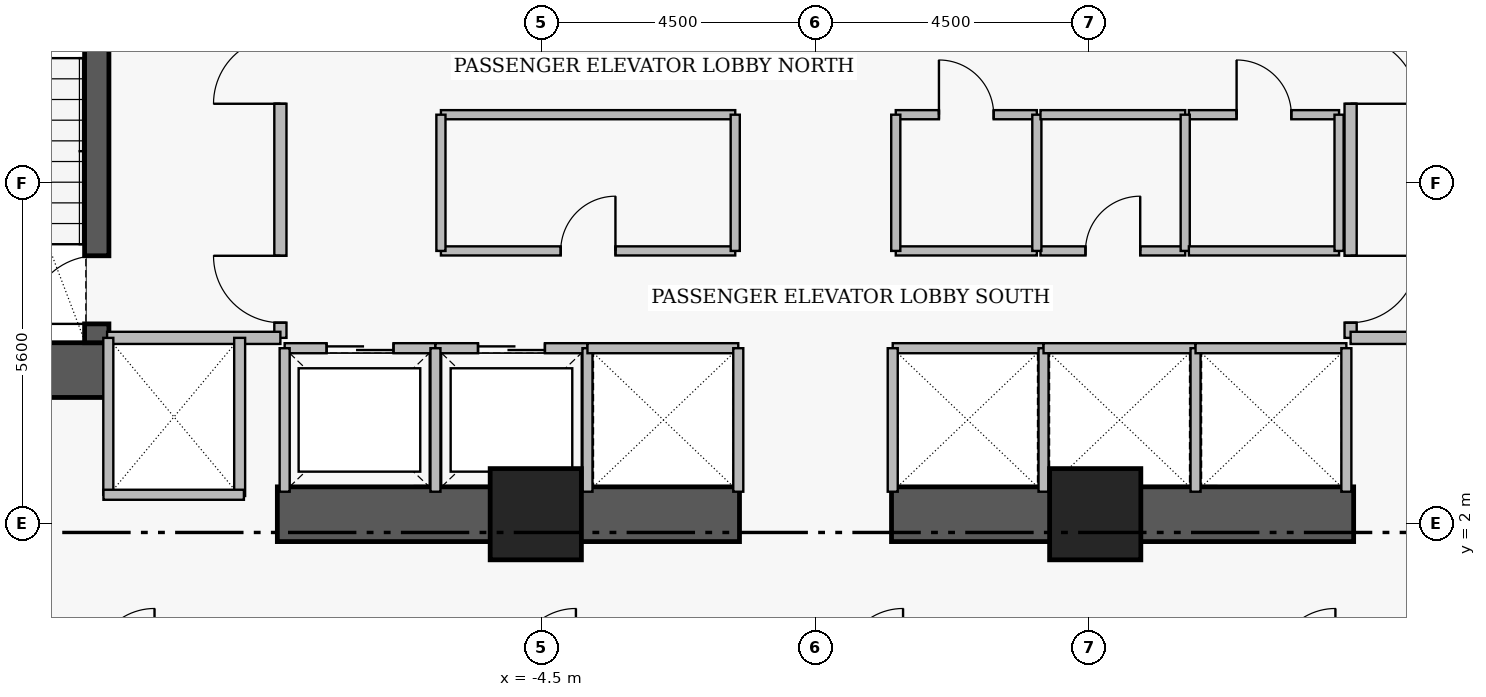
"""IFC4 building model, lengths in metres.
Left out: names, types, materials, properties, quantities, classifications, styles, units other than length and angle.
Written with IfcOpenShell. Run it as: python <this file> out.ifc"""

import sys

from ifc_helpers import new_model, si_unit, direction, frame, frame_2d, origin, origin_2d, place, context, subcontext, project, spatial, rectangle, extrude, element, fill, save


model = new_model("IFC4")
c1 = context("Model", 3, precision=1e-05, world=origin(), true_north=direction((0.0, 1.0)))
c2 = subcontext(c1, "Body", "Model", "MODEL_VIEW")
j1 = project(units=[si_unit("LENGTHUNIT", "METRE"), si_unit("PLANEANGLEUNIT", "RADIAN")], contexts=[c1])
p1 = place(None, origin())
s1 = spatial("IfcSite", under=j1, at=p1, CompositionType="ELEMENT")
p2 = place(p1, origin())
s2 = spatial("IfcBuilding", under=s1, at=p2, CompositionType="ELEMENT")
p3 = place(p2, frame((0.0, 0.0, 38.55)))
s3 = spatial("IfcBuildingStorey", under=s2, at=p3, CompositionType="ELEMENT", Elevation=38.55)
p4 = place(p3, frame((-16.31, 4.52, 0.0), z_axis=(0.0, 0.0, 1.0), x_axis=(1.0, 0.0, 0.0)))
e1 = element("IfcWall", 1, at=p4, inside=s3, PredefinedType="SHEAR", context=c2, shape_type="SweptSolid", body=[
    extrude(rectangle(XDim=4.71, YDim=0.9, at=frame_2d((2.355, 0.0))), origin(), (0.0, 0.0, 1.0), 3.46),
])
for number, where, z_axis, x_axis in (
    (2, (-8.85, 2.15, 0.0), (0.0, 0.0, 1.0), (1.0, 0.0, 0.0)),
    (3, (1.25, 2.15, 0.0), (0.0, 0.0, 1.0), (1.0, 0.0, 0.0)),
):
    element("IfcWall", number, at=place(p3, frame(where, z_axis=z_axis, x_axis=x_axis)), inside=s3, PredefinedType="SHEAR", context=c2, shape_type="SweptSolid", body=[
        extrude(rectangle(XDim=7.6, YDim=0.9, at=frame_2d((3.8, 0.0))), origin(), (0.0, 0.0, 1.0), 3.43),
    ])
p5 = place(p3, frame((-11.82, 4.97, 0.0), z_axis=(0.0, 0.0, 1.0), x_axis=(0.0, 1.0, 0.0)))
e4 = element("IfcWall", 4, at=p5, inside=s3, PredefinedType="SHEAR", context=c2, shape_type="SweptSolid", body=[
    extrude(rectangle(XDim=8.96, YDim=0.4, at=frame_2d((4.48, 0.0))), origin(), (0.0, 0.0, 1.0), 3.46),
])
p6 = place(p5, frame((0.31, 0.0, 0.0)))
e5 = element("IfcOpeningElement", 5, at=p6, cuts=e4, PredefinedType="OPENING", context=c2, shape_type="SweptSolid", body=[
    extrude(rectangle(XDim=1.12, YDim=2.22, at=frame_2d((0.56, 1.11))), frame((0.0, 0.21, 0.0), z_axis=(0.0, -1.0, 0.0), x_axis=(1.0, 0.0, 0.0)), (0.0, 0.0, 1.0), 0.42),
])
for number, where, z_axis, x_axis in (
    (6, (-4.6, 2.15, 0.0), (0.0, 0.0, 1.0), (1.0, 0.0, 0.0)),
    (7, (4.6, 2.15, 0.0), (0.0, 0.0, 1.0), (1.0, 0.0, 0.0)),
):
    element("IfcColumn", number, at=place(p3, frame(where, z_axis=z_axis, x_axis=x_axis)), inside=s3, PredefinedType="COLUMN", context=c2, shape_type="SweptSolid", body=[
        extrude(rectangle(XDim=1.5, YDim=1.5, at=origin_2d()), origin(), (0.0, 0.0, 1.0), 3.65),
    ])
p7 = place(p3, frame((-8.8, 5.05, 0.0), z_axis=(0.0, 0.0, 1.0), x_axis=(0.0, 1.0, 0.0)))
e8 = element("IfcWall", 8, at=p7, inside=s3, PredefinedType="PARTITIONING", context=c2, shape_type="SweptSolid", body=[
    extrude(rectangle(XDim=6.1, YDim=0.2, at=frame_2d((3.05, 0.0))), origin(), (0.0, 0.0, 1.0), 3.43),
])
p8 = place(p7, frame((0.25, 0.0, 0.0)))
e9 = element("IfcOpeningElement", 9, at=p8, cuts=e8, PredefinedType="OPENING", context=c2, shape_type="SweptSolid", body=[
    extrude(rectangle(XDim=1.1, YDim=2.2, at=frame_2d((0.55, 1.1))), frame((0.0, 0.11, 0.0), z_axis=(0.0, -1.0, 0.0), x_axis=(1.0, 0.0, 0.0)), (0.0, 0.0, 1.0), 0.22),
])
p9 = place(p7, frame((3.85, 0.0, 0.0)))
e10 = element("IfcOpeningElement", 10, at=p9, cuts=e8, PredefinedType="OPENING", context=c2, shape_type="SweptSolid", body=[
    extrude(rectangle(XDim=1.1, YDim=2.2, at=frame_2d((0.55, 1.1))), frame((0.0, 0.11, 0.0), z_axis=(0.0, -1.0, 0.0), x_axis=(1.0, 0.0, 0.0)), (0.0, 0.0, 1.0), 0.22),
])
p10 = place(p3, frame((8.8, 11.15, 0.0), z_axis=(0.0, 0.0, 1.0), x_axis=(0.0, -1.0, 0.0)))
e11 = element("IfcWall", 11, at=p10, inside=s3, PredefinedType="PARTITIONING", context=c2, shape_type="SweptSolid", body=[
    extrude(rectangle(XDim=6.1, YDim=0.2, at=frame_2d((3.05, 0.0))), origin(), (0.0, 0.0, 1.0), 3.43),
])
p11 = place(p10, frame((1.15, 0.0, 0.0)))
e12 = element("IfcOpeningElement", 12, at=p11, cuts=e11, PredefinedType="OPENING", context=c2, shape_type="SweptSolid", body=[
    extrude(rectangle(XDim=1.1, YDim=2.2, at=frame_2d((0.55, 1.1))), frame((0.0, 0.11, 0.0), z_axis=(0.0, -1.0, 0.0), x_axis=(1.0, 0.0, 0.0)), (0.0, 0.0, 1.0), 0.22),
])
p12 = place(p10, frame((4.75, 0.0, 0.0)))
e13 = element("IfcOpeningElement", 13, at=p12, cuts=e11, PredefinedType="OPENING", context=c2, shape_type="SweptSolid", body=[
    extrude(rectangle(XDim=1.1, YDim=2.2, at=frame_2d((0.55, 1.1))), frame((0.0, 0.11, 0.0), z_axis=(0.0, -1.0, 0.0), x_axis=(1.0, 0.0, 0.0)), (0.0, 0.0, 1.0), 0.22),
])
p13 = place(p3, frame((-8.73, 4.88, 0.0), z_axis=(0.0, 0.0, 1.0), x_axis=(1.0, 0.0, 0.0)))
e14 = element("IfcWall", 14, at=p13, inside=s3, PredefinedType="PARTITIONING", context=c2, shape_type="SweptSolid", body=[
    extrude(rectangle(XDim=2.48, YDim=0.165, at=frame_2d((1.24, 0.0))), origin(), (0.0, 0.0, 1.0), 3.43),
])
p14 = place(p13, frame((0.69, 0.0, 0.0)))
e15 = element("IfcOpeningElement", 15, at=p14, cuts=e14, PredefinedType="OPENING", context=c2, shape_type="SweptSolid", body=[
    extrude(rectangle(XDim=1.1, YDim=2.25, at=frame_2d((0.55, 1.125))), frame((0.0, 0.093, 0.0), z_axis=(0.0, -1.0, 0.0), x_axis=(1.0, 0.0, 0.0)), (0.0, 0.0, 1.0), 0.185),
])
p15 = place(p3, frame((-6.25, 4.88, 0.0), z_axis=(0.0, 0.0, 1.0), x_axis=(1.0, 0.0, 0.0)))
e16 = element("IfcWall", 16, at=p15, inside=s3, PredefinedType="PARTITIONING", context=c2, shape_type="SweptSolid", body=[
    extrude(rectangle(XDim=2.5, YDim=0.165, at=frame_2d((1.25, 0.0))), origin(), (0.0, 0.0, 1.0), 3.43),
])
p16 = place(p15, frame((0.7, 0.0, 0.0)))
e17 = element("IfcOpeningElement", 17, at=p16, cuts=e16, PredefinedType="OPENING", context=c2, shape_type="SweptSolid", body=[
    extrude(rectangle(XDim=1.1, YDim=2.25, at=frame_2d((0.55, 1.125))), frame((0.0, 0.093, 0.0), z_axis=(0.0, -1.0, 0.0), x_axis=(1.0, 0.0, 0.0)), (0.0, 0.0, 1.0), 0.185),
])
p17 = place(p3, frame((-6.16, 6.48, 0.0), z_axis=(0.0, 0.0, 1.0), x_axis=(1.0, 0.0, 0.0)))
e18 = element("IfcWall", 18, at=p17, inside=s3, PredefinedType="PARTITIONING", context=c2, shape_type="SweptSolid", body=[
    extrude(rectangle(XDim=4.84, YDim=0.15, at=frame_2d((2.42, 0.0))), origin(), (0.0, 0.0, 1.0), 3.43),
])
p18 = place(p17, frame((1.97, 0.0, 0.0)))
e19 = element("IfcOpeningElement", 19, at=p18, cuts=e18, PredefinedType="OPENING", context=c2, shape_type="SweptSolid", body=[
    extrude(rectangle(XDim=0.9, YDim=2.15, at=frame_2d((0.45, 1.075))), frame((0.0, 0.085, 0.0), z_axis=(0.0, -1.0, 0.0), x_axis=(1.0, 0.0, 0.0)), (0.0, 0.0, 1.0), 0.17),
])
p19 = place(p3, frame((1.32, 8.72, 0.0), z_axis=(0.0, 0.0, 1.0), x_axis=(1.0, 0.0, 0.0)))
e20 = element("IfcWall", 20, at=p19, inside=s3, PredefinedType="PARTITIONING", context=c2, shape_type="SweptSolid", body=[
    extrude(rectangle(XDim=2.32, YDim=0.15, at=frame_2d((1.16, 0.0))), origin(), (0.0, 0.0, 1.0), 3.43),
])
p20 = place(p19, frame((0.71, 0.0, 0.0)))
e21 = element("IfcOpeningElement", 21, at=p20, cuts=e20, PredefinedType="OPENING", context=c2, shape_type="SweptSolid", body=[
    extrude(rectangle(XDim=0.9, YDim=2.15, at=frame_2d((0.45, 1.075))), frame((0.0, 0.085, 0.0), z_axis=(0.0, -1.0, 0.0), x_axis=(1.0, 0.0, 0.0)), (0.0, 0.0, 1.0), 0.17),
])
p21 = place(p3, frame((3.7, 6.48, 0.0), z_axis=(0.0, 0.0, 1.0), x_axis=(1.0, 0.0, 0.0)))
e22 = element("IfcWall", 22, at=p21, inside=s3, PredefinedType="PARTITIONING", context=c2, shape_type="SweptSolid", body=[
    extrude(rectangle(XDim=2.38, YDim=0.15, at=frame_2d((1.19, 0.0))), origin(), (0.0, 0.0, 1.0), 3.43),
])
p22 = place(p21, frame((0.74, 0.0, 0.0)))
e23 = element("IfcOpeningElement", 23, at=p22, cuts=e22, PredefinedType="OPENING", context=c2, shape_type="SweptSolid", body=[
    extrude(rectangle(XDim=0.9, YDim=2.15, at=frame_2d((0.45, 1.075))), frame((0.0, 0.085, 0.0), z_axis=(0.0, -1.0, 0.0), x_axis=(1.0, 0.0, 0.0)), (0.0, 0.0, 1.0), 0.17),
])
p23 = place(p3, frame((6.14, 8.72, 0.0), z_axis=(0.0, 0.0, 1.0), x_axis=(1.0, 0.0, 0.0)))
e24 = element("IfcWall", 24, at=p23, inside=s3, PredefinedType="PARTITIONING", context=c2, shape_type="SweptSolid", body=[
    extrude(rectangle(XDim=2.47, YDim=0.15, at=frame_2d((1.235, 0.0))), origin(), (0.0, 0.0, 1.0), 3.43),
])
p24 = place(p23, frame((0.785, 0.0, 0.0)))
e25 = element("IfcOpeningElement", 25, at=p24, cuts=e24, PredefinedType="OPENING", context=c2, shape_type="SweptSolid", body=[
    extrude(rectangle(XDim=0.9, YDim=2.15, at=frame_2d((0.45, 1.075))), frame((0.0, 0.085, 0.0), z_axis=(0.0, -1.0, 0.0), x_axis=(1.0, 0.0, 0.0)), (0.0, 0.0, 1.0), 0.17),
])
for number, where, z_axis, x_axis in (
    (26, (-11.65, 5.05, 0.0), (0.0, 0.0, 1.0), (1.0, 0.0, 0.0)),
    (27, (8.8, 5.05, 0.0), (0.0, 0.0, 1.0), (1.0, 0.0, 0.0)),
):
    element("IfcWall", number, at=place(p3, frame(where, z_axis=z_axis, x_axis=x_axis)), inside=s3, PredefinedType="PARTITIONING", context=c2, shape_type="SweptSolid", body=[
        extrude(rectangle(XDim=2.85, YDim=0.2, at=frame_2d((1.425, 0.0))), origin(), (0.0, 0.0, 1.0), 3.43),
    ])
for number, where, z_axis, x_axis in (
    (28, (-8.73, 2.52, 0.0), (0.0, 0.0, 1.0), (0.0, 1.0, 0.0)),
    (29, (-6.25, 2.52, 0.0), (0.0, 0.0, 1.0), (0.0, 1.0, 0.0)),
    (30, (-3.75, 2.52, 0.0), (0.0, 0.0, 1.0), (0.0, 1.0, 0.0)),
):
    element("IfcWall", number, at=place(p3, frame(where, z_axis=z_axis, x_axis=x_axis)), inside=s3, PredefinedType="PARTITIONING", context=c2, shape_type="SweptSolid", body=[
        extrude(rectangle(XDim=2.36, YDim=0.165, at=frame_2d((1.18, 0.0))), origin(), (0.0, 0.0, 1.0), 3.43),
    ])
p25 = place(p3, frame((-3.75, 4.88, 0.0), z_axis=(0.0, 0.0, 1.0), x_axis=(1.0, 0.0, 0.0)))
e31 = element("IfcWall", 31, at=p25, inside=s3, PredefinedType="PARTITIONING", context=c2, shape_type="SweptSolid", body=[
    extrude(rectangle(XDim=2.48, YDim=0.165, at=frame_2d((1.24, 0.0))), origin(), (0.0, 0.0, 1.0), 3.43),
])
p26 = place(p3, frame((-1.27, 2.52, 0.0), z_axis=(0.0, 0.0, 1.0), x_axis=(0.0, 1.0, 0.0)))
e32 = element("IfcWall", 32, at=p26, inside=s3, PredefinedType="PARTITIONING", context=c2, shape_type="SweptSolid", body=[
    extrude(rectangle(XDim=2.36, YDim=0.165, at=frame_2d((1.18, 0.0))), origin(), (0.0, 0.0, 1.0), 3.43),
])
p27 = place(p3, frame((1.27, 4.88, 0.0), z_axis=(0.0, 0.0, 1.0), x_axis=(1.0, 0.0, 0.0)))
e33 = element("IfcWall", 33, at=p27, inside=s3, PredefinedType="PARTITIONING", context=c2, shape_type="SweptSolid", body=[
    extrude(rectangle(XDim=2.48, YDim=0.165, at=frame_2d((1.24, 0.0))), origin(), (0.0, 0.0, 1.0), 3.43),
])
for number, where, z_axis, x_axis in (
    (34, (1.27, 2.52, 0.0), (0.0, 0.0, 1.0), (0.0, 1.0, 0.0)),
    (35, (3.75, 2.52, 0.0), (0.0, 0.0, 1.0), (0.0, 1.0, 0.0)),
):
    element("IfcWall", number, at=place(p3, frame(where, z_axis=z_axis, x_axis=x_axis)), inside=s3, PredefinedType="PARTITIONING", context=c2, shape_type="SweptSolid", body=[
        extrude(rectangle(XDim=2.36, YDim=0.165, at=frame_2d((1.18, 0.0))), origin(), (0.0, 0.0, 1.0), 3.43),
    ])
p28 = place(p3, frame((3.75, 4.88, 0.0), z_axis=(0.0, 0.0, 1.0), x_axis=(1.0, 0.0, 0.0)))
e36 = element("IfcWall", 36, at=p28, inside=s3, PredefinedType="PARTITIONING", context=c2, shape_type="SweptSolid", body=[
    extrude(rectangle(XDim=2.5, YDim=0.165, at=frame_2d((1.25, 0.0))), origin(), (0.0, 0.0, 1.0), 3.43),
])
p29 = place(p3, frame((6.25, 2.52, 0.0), z_axis=(0.0, 0.0, 1.0), x_axis=(0.0, 1.0, 0.0)))
e37 = element("IfcWall", 37, at=p29, inside=s3, PredefinedType="PARTITIONING", context=c2, shape_type="SweptSolid", body=[
    extrude(rectangle(XDim=2.36, YDim=0.165, at=frame_2d((1.18, 0.0))), origin(), (0.0, 0.0, 1.0), 3.43),
])
p30 = place(p3, frame((6.25, 4.88, 0.0), z_axis=(0.0, 0.0, 1.0), x_axis=(1.0, 0.0, 0.0)))
e38 = element("IfcWall", 38, at=p30, inside=s3, PredefinedType="PARTITIONING", context=c2, shape_type="SweptSolid", body=[
    extrude(rectangle(XDim=2.48, YDim=0.165, at=frame_2d((1.24, 0.0))), origin(), (0.0, 0.0, 1.0), 3.43),
])
p31 = place(p3, frame((8.73, 2.52, 0.0), z_axis=(0.0, 0.0, 1.0), x_axis=(0.0, 1.0, 0.0)))
e39 = element("IfcWall", 39, at=p31, inside=s3, PredefinedType="PARTITIONING", context=c2, shape_type="SweptSolid", body=[
    extrude(rectangle(XDim=2.36, YDim=0.165, at=frame_2d((1.18, 0.0))), origin(), (0.0, 0.0, 1.0), 3.43),
])
p32 = place(p3, frame((-9.47, 2.45, 0.0), z_axis=(0.0, 0.0, 1.0), x_axis=(0.0, 1.0, 0.0)))
e40 = element("IfcWall", 40, at=p32, inside=s3, PredefinedType="PARTITIONING", context=c2, shape_type="SweptSolid", body=[
    extrude(rectangle(XDim=2.6, YDim=0.18, at=frame_2d((1.3, 0.0))), origin(), (0.0, 0.0, 1.0), 3.43),
])
p33 = place(p3, frame((-11.63, 2.47, 0.0), z_axis=(0.0, 0.0, 1.0), x_axis=(0.0, 1.0, 0.0)))
e41 = element("IfcWall", 41, at=p33, inside=s3, PredefinedType="PARTITIONING", context=c2, shape_type="SweptSolid", body=[
    extrude(rectangle(XDim=2.58, YDim=0.165, at=frame_2d((1.29, 0.0))), origin(), (0.0, 0.0, 1.0), 3.43),
])
p34 = place(p3, frame((-11.71, 2.47, 0.0), z_axis=(0.0, 0.0, 1.0), x_axis=(1.0, 0.0, 0.0)))
e42 = element("IfcWall", 42, at=p34, inside=s3, PredefinedType="PARTITIONING", context=c2, shape_type="SweptSolid", body=[
    extrude(rectangle(XDim=2.31, YDim=0.165, at=frame_2d((1.155, 0.0))), origin(), (0.0, 0.0, 1.0), 2.03),
])
p35 = place(p3, frame((-6.16, 8.72, 0.0), z_axis=(0.0, 0.0, 1.0), x_axis=(1.0, 0.0, 0.0)))
e43 = element("IfcWall", 43, at=p35, inside=s3, PredefinedType="PARTITIONING", context=c2, shape_type="SweptSolid", body=[
    extrude(rectangle(XDim=4.84, YDim=0.15, at=frame_2d((2.42, 0.0))), origin(), (0.0, 0.0, 1.0), 3.43),
])
for number, where, z_axis, x_axis in (
    (44, (-6.16, 6.48, 0.0), (0.0, 0.0, 1.0), (0.0, 1.0, 0.0)),
    (45, (-1.32, 6.48, 0.0), (0.0, 0.0, 1.0), (0.0, 1.0, 0.0)),
):
    element("IfcWall", number, at=place(p3, frame(where, z_axis=z_axis, x_axis=x_axis)), inside=s3, PredefinedType="PARTITIONING", context=c2, shape_type="SweptSolid", body=[
        extrude(rectangle(XDim=2.24, YDim=0.15, at=frame_2d((1.12, 0.0))), origin(), (0.0, 0.0, 1.0), 3.43),
    ])
p36 = place(p3, frame((1.32, 6.48, 0.0), z_axis=(0.0, 0.0, 1.0), x_axis=(1.0, 0.0, 0.0)))
e46 = element("IfcWall", 46, at=p36, inside=s3, PredefinedType="PARTITIONING", context=c2, shape_type="SweptSolid", body=[
    extrude(rectangle(XDim=2.32, YDim=0.15, at=frame_2d((1.16, 0.0))), origin(), (0.0, 0.0, 1.0), 3.43),
])
for number, where, z_axis, x_axis in (
    (47, (1.32, 6.48, 0.0), (0.0, 0.0, 1.0), (0.0, 1.0, 0.0)),
    (48, (3.64, 6.48, 0.0), (0.0, 0.0, 1.0), (0.0, 1.0, 0.0)),
):
    element("IfcWall", number, at=place(p3, frame(where, z_axis=z_axis, x_axis=x_axis)), inside=s3, PredefinedType="PARTITIONING", context=c2, shape_type="SweptSolid", body=[
        extrude(rectangle(XDim=2.24, YDim=0.15, at=frame_2d((1.12, 0.0))), origin(), (0.0, 0.0, 1.0), 3.43),
    ])
p37 = place(p3, frame((3.7, 8.72, 0.0), z_axis=(0.0, 0.0, 1.0), x_axis=(1.0, 0.0, 0.0)))
e49 = element("IfcWall", 49, at=p37, inside=s3, PredefinedType="PARTITIONING", context=c2, shape_type="SweptSolid", body=[
    extrude(rectangle(XDim=2.38, YDim=0.15, at=frame_2d((1.19, 0.0))), origin(), (0.0, 0.0, 1.0), 3.43),
])
p38 = place(p3, frame((6.08, 6.48, 0.0), z_axis=(0.0, 0.0, 1.0), x_axis=(0.0, 1.0, 0.0)))
e50 = element("IfcWall", 50, at=p38, inside=s3, PredefinedType="PARTITIONING", context=c2, shape_type="SweptSolid", body=[
    extrude(rectangle(XDim=2.24, YDim=0.15, at=frame_2d((1.12, 0.0))), origin(), (0.0, 0.0, 1.0), 3.43),
])
p39 = place(p3, frame((6.14, 6.48, 0.0), z_axis=(0.0, 0.0, 1.0), x_axis=(1.0, 0.0, 0.0)))
e51 = element("IfcWall", 51, at=p39, inside=s3, PredefinedType="PARTITIONING", context=c2, shape_type="SweptSolid", body=[
    extrude(rectangle(XDim=2.47, YDim=0.15, at=frame_2d((1.235, 0.0))), origin(), (0.0, 0.0, 1.0), 3.43),
])
p40 = place(p3, frame((8.61, 6.48, 0.0), z_axis=(0.0, 0.0, 1.0), x_axis=(0.0, 1.0, 0.0)))
e52 = element("IfcWall", 52, at=p40, inside=s3, PredefinedType="PARTITIONING", context=c2, shape_type="SweptSolid", body=[
    extrude(rectangle(XDim=2.24, YDim=0.15, at=frame_2d((1.12, 0.0))), origin(), (0.0, 0.0, 1.0), 3.43),
])
p41 = place(p6, origin())
e53 = element("IfcDoor", 53, at=p41, inside=s3, OperationType="SINGLE_SWING_LEFT", PredefinedType="DOOR", context=c2, shape_type="SweptSolid", body=[
    extrude(rectangle(XDim=1.12, YDim=2.22, at=frame_2d((0.56, 1.11))), frame((0.0, 0.025, 0.0), z_axis=(0.0, -1.0, 0.0), x_axis=(1.0, 0.0, 0.0)), (0.0, 0.0, 1.0), 0.05),
])
fill(e5, e53)
p42 = place(p8, origin())
e54 = element("IfcDoor", 54, at=p42, inside=s3, OperationType="SINGLE_SWING_RIGHT", PredefinedType="DOOR", context=c2, shape_type="SweptSolid", body=[
    extrude(rectangle(XDim=1.1, YDim=2.2, at=frame_2d((0.55, 1.1))), frame((0.0, 0.025, 0.0), z_axis=(0.0, -1.0, 0.0), x_axis=(1.0, 0.0, 0.0)), (0.0, 0.0, 1.0), 0.05),
])
fill(e9, e54)
p43 = place(p9, origin())
e55 = element("IfcDoor", 55, at=p43, inside=s3, OperationType="SINGLE_SWING_LEFT", PredefinedType="DOOR", context=c2, shape_type="SweptSolid", body=[
    extrude(rectangle(XDim=1.1, YDim=2.2, at=frame_2d((0.55, 1.1))), frame((0.0, 0.025, 0.0), z_axis=(0.0, -1.0, 0.0), x_axis=(1.0, 0.0, 0.0)), (0.0, 0.0, 1.0), 0.05),
])
fill(e10, e55)
p44 = place(p11, origin())
e56 = element("IfcDoor", 56, at=p44, inside=s3, OperationType="SINGLE_SWING_RIGHT", PredefinedType="DOOR", context=c2, shape_type="SweptSolid", body=[
    extrude(rectangle(XDim=1.1, YDim=2.2, at=frame_2d((0.55, 1.1))), frame((0.0, 0.025, 0.0), z_axis=(0.0, -1.0, 0.0), x_axis=(1.0, 0.0, 0.0)), (0.0, 0.0, 1.0), 0.05),
])
fill(e12, e56)
p45 = place(p12, origin())
e57 = element("IfcDoor", 57, at=p45, inside=s3, OperationType="SINGLE_SWING_LEFT", PredefinedType="DOOR", context=c2, shape_type="SweptSolid", body=[
    extrude(rectangle(XDim=1.1, YDim=2.2, at=frame_2d((0.55, 1.1))), frame((0.0, 0.025, 0.0), z_axis=(0.0, -1.0, 0.0), x_axis=(1.0, 0.0, 0.0)), (0.0, 0.0, 1.0), 0.05),
])
fill(e13, e57)
p46 = place(p14, origin())
e58 = element("IfcDoor", 58, at=p46, inside=s3, OperationType="SLIDING_TO_LEFT", PredefinedType="DOOR", context=c2, shape_type="SweptSolid", body=[
    extrude(rectangle(XDim=1.1, YDim=2.25, at=frame_2d((0.55, 1.125))), frame((0.0, 0.025, 0.0), z_axis=(0.0, -1.0, 0.0), x_axis=(1.0, 0.0, 0.0)), (0.0, 0.0, 1.0), 0.05),
])
fill(e15, e58)
p47 = place(p16, origin())
e59 = element("IfcDoor", 59, at=p47, inside=s3, OperationType="SLIDING_TO_LEFT", PredefinedType="DOOR", context=c2, shape_type="SweptSolid", body=[
    extrude(rectangle(XDim=1.1, YDim=2.25, at=frame_2d((0.55, 1.125))), frame((0.0, 0.025, 0.0), z_axis=(0.0, -1.0, 0.0), x_axis=(1.0, 0.0, 0.0)), (0.0, 0.0, 1.0), 0.05),
])
fill(e17, e59)
p48 = place(p18, origin())
e60 = element("IfcDoor", 60, at=p48, inside=s3, OperationType="SINGLE_SWING_RIGHT", PredefinedType="DOOR", context=c2, shape_type="SweptSolid", body=[
    extrude(rectangle(XDim=0.9, YDim=2.15, at=frame_2d((0.45, 1.075))), frame((0.0, 0.025, 0.0), z_axis=(0.0, -1.0, 0.0), x_axis=(1.0, 0.0, 0.0)), (0.0, 0.0, 1.0), 0.05),
])
fill(e19, e60)
p49 = place(p20, origin())
e61 = element("IfcDoor", 61, at=p49, inside=s3, OperationType="SINGLE_SWING_LEFT", PredefinedType="DOOR", context=c2, shape_type="SweptSolid", body=[
    extrude(rectangle(XDim=0.9, YDim=2.15, at=frame_2d((0.45, 1.075))), frame((0.0, 0.025, 0.0), z_axis=(0.0, -1.0, 0.0), x_axis=(1.0, 0.0, 0.0)), (0.0, 0.0, 1.0), 0.05),
])
fill(e21, e61)
p50 = place(p22, origin())
e62 = element("IfcDoor", 62, at=p50, inside=s3, OperationType="SINGLE_SWING_RIGHT", PredefinedType="DOOR", context=c2, shape_type="SweptSolid", body=[
    extrude(rectangle(XDim=0.9, YDim=2.15, at=frame_2d((0.45, 1.075))), frame((0.0, 0.025, 0.0), z_axis=(0.0, -1.0, 0.0), x_axis=(1.0, 0.0, 0.0)), (0.0, 0.0, 1.0), 0.05),
])
fill(e23, e62)
p51 = place(p24, origin())
e63 = element("IfcDoor", 63, at=p51, inside=s3, OperationType="SINGLE_SWING_LEFT", PredefinedType="DOOR", context=c2, shape_type="SweptSolid", body=[
    extrude(rectangle(XDim=0.9, YDim=2.15, at=frame_2d((0.45, 1.075))), frame((0.0, 0.025, 0.0), z_axis=(0.0, -1.0, 0.0), x_axis=(1.0, 0.0, 0.0)), (0.0, 0.0, 1.0), 0.05),
])
fill(e25, e63)
save(model, sys.argv[1])
